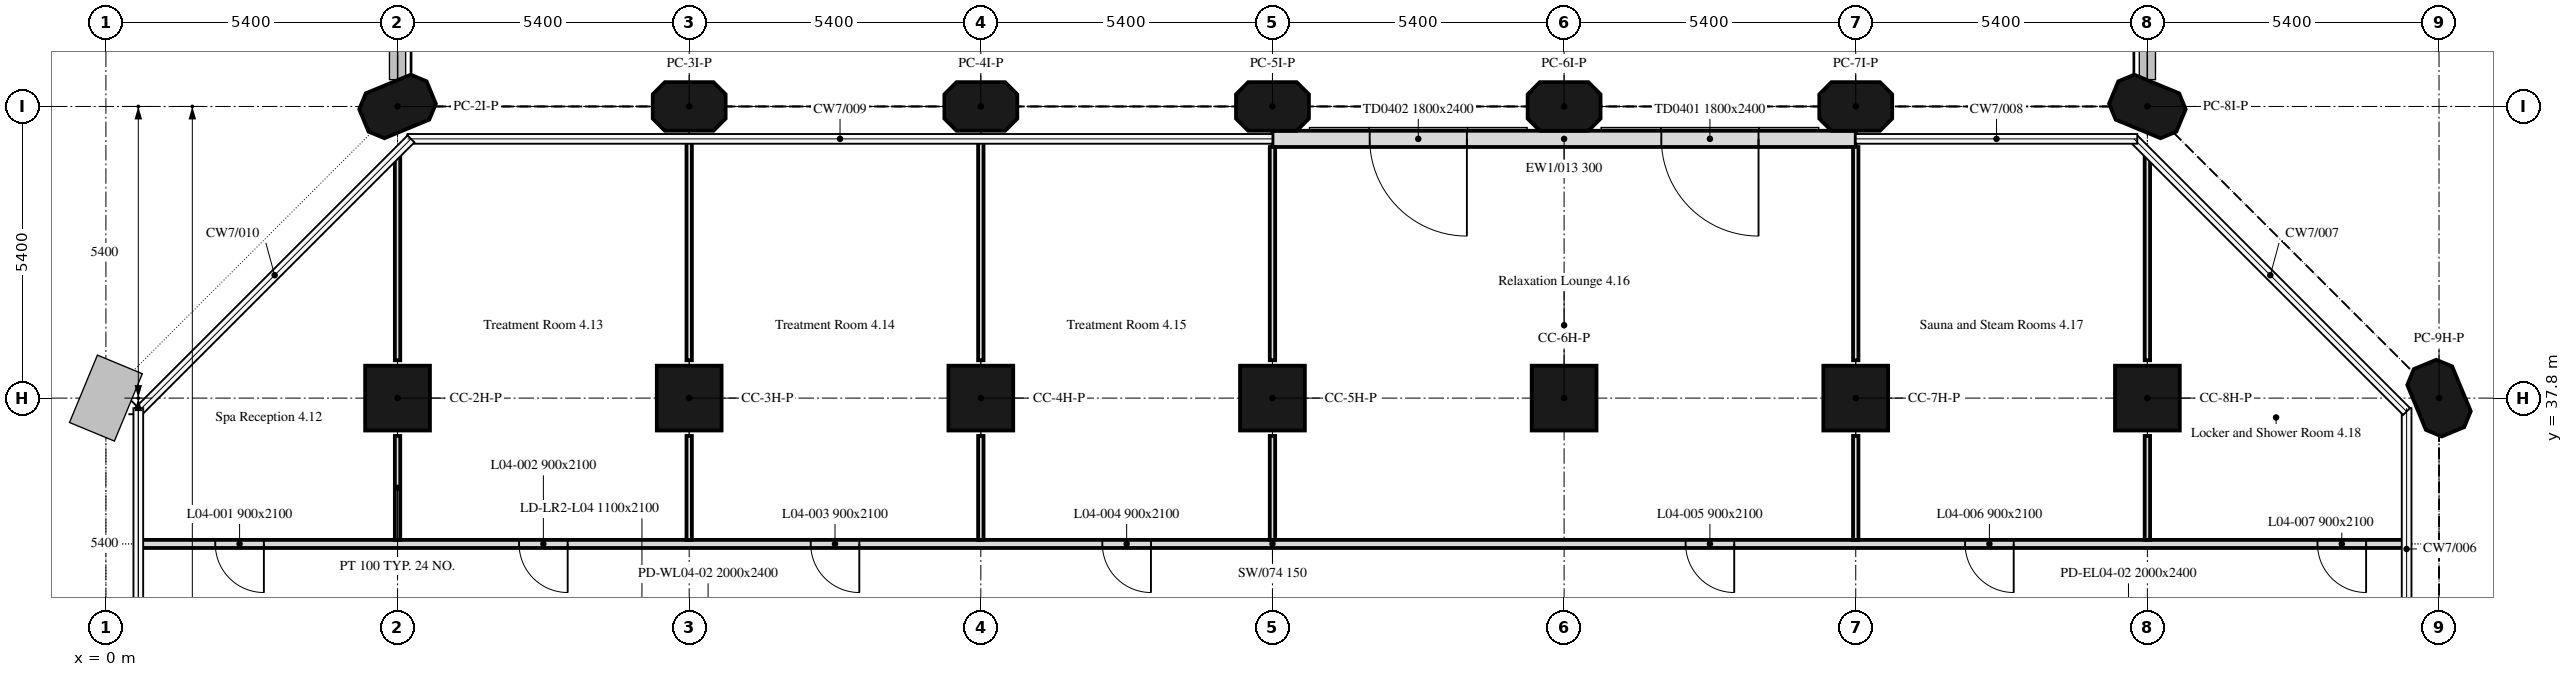
"""IFC4 building model, lengths in metres.
Left out: names, types, materials, properties, quantities, classifications, styles, units other than length and angle.
Written with IfcOpenShell. Run it as: python <this file> out.ifc"""

import sys

from ifc_helpers import new_model, si_unit, direction, frame, frame_2d, origin, origin_2d, place, context, subcontext, project, spatial, polyline, rectangle, outline, extrude, element, fill, save


model = new_model("IFC4")
c1 = context("Model", 3, precision=1e-05, world=origin(), true_north=direction((0.0, 1.0)))
c2 = subcontext(c1, "Body", "Model", "MODEL_VIEW")
j1 = project(units=[si_unit("LENGTHUNIT", "METRE"), si_unit("PLANEANGLEUNIT", "RADIAN")], contexts=[c1])
p1 = place(None, origin())
s1 = spatial("IfcSite", under=j1, at=p1, CompositionType="ELEMENT")
p2 = place(p1, origin())
s2 = spatial("IfcBuilding", under=s1, at=p2, CompositionType="ELEMENT")
p3 = place(p2, frame((0.0, 0.0, 24.6)))
s3 = spatial("IfcBuildingStorey", under=s2, at=p3, CompositionType="ELEMENT", Elevation=24.6)
for number, where, z_axis, x_axis in (
    (1, (5.4, 37.8, 0.0), (0.0, 0.0, 1.0), (1.0, 0.0, 0.0)),
    (2, (10.8, 37.8, 0.0), (0.0, 0.0, 1.0), (1.0, 0.0, 0.0)),
    (3, (16.2, 37.8, 0.0), (0.0, 0.0, 1.0), (1.0, 0.0, 0.0)),
    (4, (21.6, 37.8, 0.0), (0.0, 0.0, 1.0), (1.0, 0.0, 0.0)),
    (5, (27.0, 37.8, 0.0), (0.0, 0.0, 1.0), (1.0, 0.0, 0.0)),
    (6, (32.4, 37.8, 0.0), (0.0, 0.0, 1.0), (1.0, 0.0, 0.0)),
    (7, (37.8, 37.8, 0.0), (0.0, 0.0, 1.0), (1.0, 0.0, 0.0)),
):
    element("IfcColumn", number, at=place(p3, frame(where, z_axis=z_axis, x_axis=x_axis)), inside=s3, PredefinedType="COLUMN", context=c2, shape_type="SweptSolid", body=[
        extrude(rectangle(XDim=1.2, YDim=1.2, at=origin_2d()), origin(), (0.0, 0.0, 1.0), 4.1),
    ])
for number, where, z_axis, x_axis in (
    (8, (43.2, 37.8, 0.0), (0.0, 0.0, 1.0), (-0.383, 0.924, 0.0)),
    (9, (5.4, 43.2, 0.0), (0.0, 0.0, 1.0), (0.924, 0.383, 0.0)),
    (10, (10.8, 43.2, 0.0), (0.0, 0.0, 1.0), (1.0, 0.0, 0.0)),
    (11, (16.2, 43.2, 0.0), (0.0, 0.0, 1.0), (1.0, 0.0, 0.0)),
    (12, (21.6, 43.2, 0.0), (0.0, 0.0, 1.0), (1.0, 0.0, 0.0)),
    (13, (27.0, 43.2, 0.0), (0.0, 0.0, 1.0), (1.0, 0.0, 0.0)),
    (14, (32.4, 43.2, 0.0), (0.0, 0.0, 1.0), (1.0, 0.0, 0.0)),
    (15, (37.8, 43.2, 0.0), (0.0, 0.0, 1.0), (-0.924, 0.383, 0.0)),
):
    element("IfcColumn", number, at=place(p3, frame(where, z_axis=z_axis, x_axis=x_axis)), inside=s3, PredefinedType="COLUMN", context=c2, shape_type="SweptSolid", body=[
        extrude(outline(polyline([(-0.45, -0.45), (0.45, -0.45), (0.675, -0.225), (0.675, 0.225), (0.45, 0.45), (-0.45, 0.45), (-0.675, 0.225), (-0.675, -0.225), (-0.45, -0.45)])), origin(), (0.0, 0.0, 1.0), 4.1),
    ])
p4 = place(p3, frame((32.4, 42.6, 0.0), z_axis=(0.0, 0.0, 1.0), x_axis=(-1.0, 0.0, 0.0)))
e16 = element("IfcWall", 16, at=p4, inside=s3, PredefinedType="SOLIDWALL", context=c2, shape_type="SweptSolid", body=[
    extrude(rectangle(XDim=10.8, YDim=0.3, at=frame_2d((5.4, 0.0))), origin(), (0.0, 0.0, 1.0), 4.1),
])
p5 = place(p4, frame((1.8, 0.0, 0.0)))
e17 = element("IfcOpeningElement", 17, at=p5, cuts=e16, PredefinedType="OPENING", context=c2, shape_type="SweptSolid", body=[
    extrude(rectangle(XDim=1.8, YDim=2.4, at=frame_2d((0.9, 1.2))), frame((0.0, 0.16, 0.0), z_axis=(0.0, -1.0, 0.0), x_axis=(1.0, 0.0, 0.0)), (0.0, 0.0, 1.0), 0.32),
])
p6 = place(p4, frame((7.2, 0.0, 0.0)))
e18 = element("IfcOpeningElement", 18, at=p6, cuts=e16, PredefinedType="OPENING", context=c2, shape_type="SweptSolid", body=[
    extrude(rectangle(XDim=1.8, YDim=2.4, at=frame_2d((0.9, 1.2))), frame((0.0, 0.16, 0.0), z_axis=(0.0, -1.0, 0.0), x_axis=(1.0, 0.0, 0.0)), (0.0, 0.0, 1.0), 0.32),
])
p7 = place(p3, frame((42.6, 35.1, 0.0), z_axis=(0.0, 0.0, 1.0), x_axis=(-1.0, 0.0, 0.0)))
e19 = element("IfcWall", 19, at=p7, inside=s3, PredefinedType="PARTITIONING", context=c2, shape_type="SweptSolid", body=[
    extrude(rectangle(XDim=42.0, YDim=0.15, at=frame_2d((21.0, 0.0))), origin(), (0.0, 0.0, 1.0), 4.1),
])
p8 = place(p7, frame((39.675, 0.0, 0.0)))
e20 = element("IfcOpeningElement", 20, at=p8, cuts=e19, PredefinedType="OPENING", context=c2, shape_type="SweptSolid", body=[
    extrude(rectangle(XDim=0.9, YDim=2.1, at=frame_2d((0.45, 1.05))), frame((0.0, 0.075, 0.0), z_axis=(0.0, -1.0, 0.0), x_axis=(1.0, 0.0, 0.0)), (0.0, 0.0, 1.0), 0.15),
])
p9 = place(p7, frame((34.05, 0.0, 0.0)))
e21 = element("IfcOpeningElement", 21, at=p9, cuts=e19, PredefinedType="OPENING", context=c2, shape_type="SweptSolid", body=[
    extrude(rectangle(XDim=0.9, YDim=2.1, at=frame_2d((0.45, 1.05))), frame((0.0, 0.075, 0.0), z_axis=(0.0, -1.0, 0.0), x_axis=(1.0, 0.0, 0.0)), (0.0, 0.0, 1.0), 0.15),
])
p10 = place(p7, frame((28.65, 0.0, 0.0)))
e22 = element("IfcOpeningElement", 22, at=p10, cuts=e19, PredefinedType="OPENING", context=c2, shape_type="SweptSolid", body=[
    extrude(rectangle(XDim=0.9, YDim=2.1, at=frame_2d((0.45, 1.05))), frame((0.0, 0.075, 0.0), z_axis=(0.0, -1.0, 0.0), x_axis=(1.0, 0.0, 0.0)), (0.0, 0.0, 1.0), 0.15),
])
p11 = place(p7, frame((23.25, 0.0, 0.0)))
e23 = element("IfcOpeningElement", 23, at=p11, cuts=e19, PredefinedType="OPENING", context=c2, shape_type="SweptSolid", body=[
    extrude(rectangle(XDim=0.9, YDim=2.1, at=frame_2d((0.45, 1.05))), frame((0.0, 0.075, 0.0), z_axis=(0.0, -1.0, 0.0), x_axis=(1.0, 0.0, 0.0)), (0.0, 0.0, 1.0), 0.15),
])
p12 = place(p7, frame((12.45, 0.0, 0.0)))
e24 = element("IfcOpeningElement", 24, at=p12, cuts=e19, PredefinedType="OPENING", context=c2, shape_type="SweptSolid", body=[
    extrude(rectangle(XDim=0.9, YDim=2.1, at=frame_2d((0.45, 1.05))), frame((0.0, 0.075, 0.0), z_axis=(0.0, -1.0, 0.0), x_axis=(1.0, 0.0, 0.0)), (0.0, 0.0, 1.0), 0.15),
])
p13 = place(p7, frame((7.275, 0.0, 0.0)))
e25 = element("IfcOpeningElement", 25, at=p13, cuts=e19, PredefinedType="OPENING", context=c2, shape_type="SweptSolid", body=[
    extrude(rectangle(XDim=0.9, YDim=2.1, at=frame_2d((0.45, 1.05))), frame((0.0, 0.075, 0.0), z_axis=(0.0, -1.0, 0.0), x_axis=(1.0, 0.0, 0.0)), (0.0, 0.0, 1.0), 0.15),
])
p14 = place(p7, frame((0.75, 0.0, 0.0)))
e26 = element("IfcOpeningElement", 26, at=p14, cuts=e19, PredefinedType="OPENING", context=c2, shape_type="SweptSolid", body=[
    extrude(rectangle(XDim=0.9, YDim=2.1, at=frame_2d((0.45, 1.05))), frame((0.0, 0.075, 0.0), z_axis=(0.0, -1.0, 0.0), x_axis=(1.0, 0.0, 0.0)), (0.0, 0.0, 1.0), 0.15),
])
p15 = place(p3, frame((5.4, 35.175, 0.0), z_axis=(0.0, 0.0, 1.0), x_axis=(0.0, 1.0, 0.0)))
e27 = element("IfcWall", 27, at=p15, inside=s3, PredefinedType="PARTITIONING", context=c2, shape_type="SweptSolid", body=[
    extrude(rectangle(XDim=1.924, YDim=0.1, at=frame_2d((0.962, 0.0))), origin(), (0.0, 0.0, 1.0), 4.1),
])
p16 = place(p3, frame((5.4, 38.501, 0.0), z_axis=(0.0, 0.0, 1.0), x_axis=(0.0, 1.0, 0.0)))
e28 = element("IfcWall", 28, at=p16, inside=s3, PredefinedType="PARTITIONING", context=c2, shape_type="SweptSolid", body=[
    extrude(rectangle(XDim=3.801, YDim=0.1, at=frame_2d((1.9, 0.0))), origin(), (0.0, 0.0, 1.0), 4.1),
])
p17 = place(p3, frame((10.8, 35.175, 0.0), z_axis=(0.0, 0.0, 1.0), x_axis=(0.0, 1.0, 0.0)))
e29 = element("IfcWall", 29, at=p17, inside=s3, PredefinedType="PARTITIONING", context=c2, shape_type="SweptSolid", body=[
    extrude(rectangle(XDim=1.924, YDim=0.1, at=frame_2d((0.962, 0.0))), origin(), (0.0, 0.0, 1.0), 4.1),
])
p18 = place(p3, frame((10.8, 38.501, 0.0), z_axis=(0.0, 0.0, 1.0), x_axis=(0.0, 1.0, 0.0)))
e30 = element("IfcWall", 30, at=p18, inside=s3, PredefinedType="PARTITIONING", context=c2, shape_type="SweptSolid", body=[
    extrude(rectangle(XDim=4.099, YDim=0.1, at=frame_2d((2.05, 0.0))), origin(), (0.0, 0.0, 1.0), 4.1),
])
p19 = place(p3, frame((16.2, 35.175, 0.0), z_axis=(0.0, 0.0, 1.0), x_axis=(0.0, 1.0, 0.0)))
e31 = element("IfcWall", 31, at=p19, inside=s3, PredefinedType="PARTITIONING", context=c2, shape_type="SweptSolid", body=[
    extrude(rectangle(XDim=1.924, YDim=0.1, at=frame_2d((0.962, 0.0))), origin(), (0.0, 0.0, 1.0), 4.1),
])
p20 = place(p3, frame((16.2, 38.501, 0.0), z_axis=(0.0, 0.0, 1.0), x_axis=(0.0, 1.0, 0.0)))
e32 = element("IfcWall", 32, at=p20, inside=s3, PredefinedType="PARTITIONING", context=c2, shape_type="SweptSolid", body=[
    extrude(rectangle(XDim=4.099, YDim=0.1, at=frame_2d((2.05, 0.0))), origin(), (0.0, 0.0, 1.0), 4.1),
])
p21 = place(p3, frame((21.6, 35.175, 0.0), z_axis=(0.0, 0.0, 1.0), x_axis=(0.0, 1.0, 0.0)))
e33 = element("IfcWall", 33, at=p21, inside=s3, PredefinedType="PARTITIONING", context=c2, shape_type="SweptSolid", body=[
    extrude(rectangle(XDim=1.924, YDim=0.1, at=frame_2d((0.962, 0.0))), origin(), (0.0, 0.0, 1.0), 4.1),
])
p22 = place(p3, frame((21.6, 38.501, 0.0), z_axis=(0.0, 0.0, 1.0), x_axis=(0.0, 1.0, 0.0)))
e34 = element("IfcWall", 34, at=p22, inside=s3, PredefinedType="PARTITIONING", context=c2, shape_type="SweptSolid", body=[
    extrude(rectangle(XDim=3.948, YDim=0.1, at=frame_2d((1.974, 0.0))), origin(), (0.0, 0.0, 1.0), 4.1),
])
p23 = place(p3, frame((32.4, 35.175, 0.0), z_axis=(0.0, 0.0, 1.0), x_axis=(0.0, 1.0, 0.0)))
e35 = element("IfcWall", 35, at=p23, inside=s3, PredefinedType="PARTITIONING", context=c2, shape_type="SweptSolid", body=[
    extrude(rectangle(XDim=1.924, YDim=0.1, at=frame_2d((0.962, 0.0))), origin(), (0.0, 0.0, 1.0), 4.1),
])
p24 = place(p3, frame((32.4, 38.501, 0.0), z_axis=(0.0, 0.0, 1.0), x_axis=(0.0, 1.0, 0.0)))
e36 = element("IfcWall", 36, at=p24, inside=s3, PredefinedType="PARTITIONING", context=c2, shape_type="SweptSolid", body=[
    extrude(rectangle(XDim=3.948, YDim=0.1, at=frame_2d((1.974, 0.0))), origin(), (0.0, 0.0, 1.0), 4.1),
])
p25 = place(p3, frame((37.8, 35.175, 0.0), z_axis=(0.0, 0.0, 1.0), x_axis=(0.0, 1.0, 0.0)))
e37 = element("IfcWall", 37, at=p25, inside=s3, PredefinedType="PARTITIONING", context=c2, shape_type="SweptSolid", body=[
    extrude(rectangle(XDim=1.924, YDim=0.1, at=frame_2d((0.962, 0.0))), origin(), (0.0, 0.0, 1.0), 4.1),
])
p26 = place(p3, frame((37.8, 38.501, 0.0), z_axis=(0.0, 0.0, 1.0), x_axis=(0.0, 1.0, 0.0)))
e38 = element("IfcWall", 38, at=p26, inside=s3, PredefinedType="PARTITIONING", context=c2, shape_type="SweptSolid", body=[
    extrude(rectangle(XDim=3.801, YDim=0.1, at=frame_2d((1.9, 0.0))), origin(), (0.0, 0.0, 1.0), 4.1),
])
p27 = place(p5, origin())
e39 = element("IfcDoor", 39, at=p27, inside=s3, OperationType="DOUBLE_DOOR_DOUBLE_SWING", PredefinedType="DOOR", context=c2, shape_type="SweptSolid", body=[
    extrude(rectangle(XDim=1.8, YDim=2.4, at=frame_2d((0.9, 1.2))), frame((0.0, 0.025, 0.0), z_axis=(0.0, -1.0, 0.0), x_axis=(1.0, 0.0, 0.0)), (0.0, 0.0, 1.0), 0.05),
])
fill(e17, e39)
p28 = place(p6, origin())
e40 = element("IfcDoor", 40, at=p28, inside=s3, OperationType="DOUBLE_DOOR_DOUBLE_SWING", PredefinedType="DOOR", context=c2, shape_type="SweptSolid", body=[
    extrude(rectangle(XDim=1.8, YDim=2.4, at=frame_2d((0.9, 1.2))), frame((0.0, 0.025, 0.0), z_axis=(0.0, -1.0, 0.0), x_axis=(1.0, 0.0, 0.0)), (0.0, 0.0, 1.0), 0.05),
])
fill(e18, e40)
p29 = place(p8, origin())
e41 = element("IfcDoor", 41, at=p29, inside=s3, OperationType="SINGLE_SWING_RIGHT", PredefinedType="DOOR", context=c2, shape_type="SweptSolid", body=[
    extrude(rectangle(XDim=0.9, YDim=2.1, at=frame_2d((0.45, 1.05))), frame((0.0, 0.025, 0.0), z_axis=(0.0, -1.0, 0.0), x_axis=(1.0, 0.0, 0.0)), (0.0, 0.0, 1.0), 0.05),
])
fill(e20, e41)
p30 = place(p9, origin())
e42 = element("IfcDoor", 42, at=p30, inside=s3, OperationType="SINGLE_SWING_RIGHT", PredefinedType="DOOR", context=c2, shape_type="SweptSolid", body=[
    extrude(rectangle(XDim=0.9, YDim=2.1, at=frame_2d((0.45, 1.05))), frame((0.0, 0.025, 0.0), z_axis=(0.0, -1.0, 0.0), x_axis=(1.0, 0.0, 0.0)), (0.0, 0.0, 1.0), 0.05),
])
fill(e21, e42)
p31 = place(p10, origin())
e43 = element("IfcDoor", 43, at=p31, inside=s3, OperationType="SINGLE_SWING_RIGHT", PredefinedType="DOOR", context=c2, shape_type="SweptSolid", body=[
    extrude(rectangle(XDim=0.9, YDim=2.1, at=frame_2d((0.45, 1.05))), frame((0.0, 0.025, 0.0), z_axis=(0.0, -1.0, 0.0), x_axis=(1.0, 0.0, 0.0)), (0.0, 0.0, 1.0), 0.05),
])
fill(e22, e43)
p32 = place(p11, origin())
e44 = element("IfcDoor", 44, at=p32, inside=s3, OperationType="SINGLE_SWING_LEFT", PredefinedType="DOOR", context=c2, shape_type="SweptSolid", body=[
    extrude(rectangle(XDim=0.9, YDim=2.1, at=frame_2d((0.45, 1.05))), frame((0.0, 0.025, 0.0), z_axis=(0.0, -1.0, 0.0), x_axis=(1.0, 0.0, 0.0)), (0.0, 0.0, 1.0), 0.05),
])
fill(e23, e44)
p33 = place(p12, origin())
e45 = element("IfcDoor", 45, at=p33, inside=s3, OperationType="SINGLE_SWING_LEFT", PredefinedType="DOOR", context=c2, shape_type="SweptSolid", body=[
    extrude(rectangle(XDim=0.9, YDim=2.1, at=frame_2d((0.45, 1.05))), frame((0.0, 0.025, 0.0), z_axis=(0.0, -1.0, 0.0), x_axis=(1.0, 0.0, 0.0)), (0.0, 0.0, 1.0), 0.05),
])
fill(e24, e45)
p34 = place(p13, origin())
e46 = element("IfcDoor", 46, at=p34, inside=s3, OperationType="SINGLE_SWING_LEFT", PredefinedType="DOOR", context=c2, shape_type="SweptSolid", body=[
    extrude(rectangle(XDim=0.9, YDim=2.1, at=frame_2d((0.45, 1.05))), frame((0.0, 0.025, 0.0), z_axis=(0.0, -1.0, 0.0), x_axis=(1.0, 0.0, 0.0)), (0.0, 0.0, 1.0), 0.05),
])
fill(e25, e46)
p35 = place(p14, origin())
e47 = element("IfcDoor", 47, at=p35, inside=s3, OperationType="SINGLE_SWING_LEFT", PredefinedType="DOOR", context=c2, shape_type="SweptSolid", body=[
    extrude(rectangle(XDim=0.9, YDim=2.1, at=frame_2d((0.45, 1.05))), frame((0.0, 0.025, 0.0), z_axis=(0.0, -1.0, 0.0), x_axis=(1.0, 0.0, 0.0)), (0.0, 0.0, 1.0), 0.05),
])
fill(e26, e47)
save(model, sys.argv[1])
